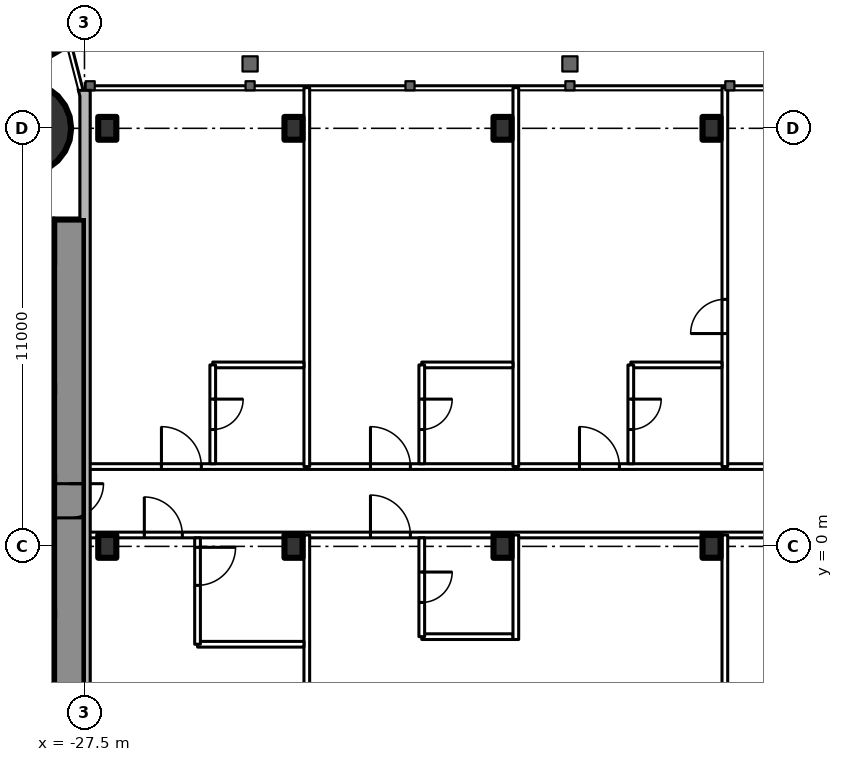
"""IFC4 building model, lengths in metres.
Left out: names, types, materials, properties, quantities, classifications, styles, units other than length and angle.
Written with IfcOpenShell. Run it as: python <this file> out.ifc"""

import sys

from ifc_helpers import new_model, si_unit, direction, frame, frame_2d, origin, origin_2d, place, context, subcontext, project, spatial, rectangle, circle, i_section, extrude, element, fill, save


model = new_model("IFC4")
c1 = context("Model", 3, precision=1e-05, world=origin(), true_north=direction((0.0, 1.0)))
c2 = subcontext(c1, "Body", "Model", "MODEL_VIEW")
j1 = project(units=[si_unit("LENGTHUNIT", "METRE"), si_unit("PLANEANGLEUNIT", "RADIAN")], contexts=[c1])
p1 = place(None, origin())
s1 = spatial("IfcSite", under=j1, at=p1, CompositionType="ELEMENT")
p2 = place(p1, origin())
s2 = spatial("IfcBuilding", under=s1, at=p2, CompositionType="ELEMENT")
p3 = place(p2, frame((0.0, 0.0, 226.1)))
s3 = spatial("IfcBuildingStorey", under=s2, at=p3, CompositionType="ELEMENT", Elevation=226.1)
p4 = place(p3, frame((-29.05, 11.0, 0.0), z_axis=(0.0, 0.0, 1.0), x_axis=(1.0, 0.0, 0.0)))
e1 = element("IfcColumn", 1, at=p4, inside=s3, PredefinedType="COLUMN", context=c2, shape_type="SweptSolid", body=[
    extrude(circle(Radius=1.2, at=origin_2d()), origin(), (0.0, 0.0, 1.0), 3.6),
])
p5 = place(p3, frame((-27.9, 8.6, 0.0), z_axis=(0.0, 0.0, 1.0), x_axis=(0.0, -1.0, 0.0)))
e2 = element("IfcWall", 2, at=p5, inside=s3, PredefinedType="SHEAR", context=c2, shape_type="SweptSolid", body=[
    extrude(rectangle(XDim=17.2, YDim=0.8, at=frame_2d((8.6, 0.0))), origin(), (0.0, 0.0, 1.0), 3.6),
])
p6 = place(p5, frame((6.95, 0.0, 0.0)))
e3 = element("IfcOpeningElement", 3, at=p6, cuts=e2, PredefinedType="OPENING", context=c2, shape_type="SweptSolid", body=[
    extrude(rectangle(XDim=0.9, YDim=2.2, at=frame_2d((0.45, 1.1))), frame((0.0, 0.41, 0.0), z_axis=(0.0, -1.0, 0.0), x_axis=(1.0, 0.0, 0.0)), (0.0, 0.0, 1.0), 0.82),
])
p7 = place(p3, frame((-28.3, 8.0, 0.0), z_axis=(0.0, 0.0, 1.0), x_axis=(-1.0, 0.0, 0.0)))
e4 = element("IfcWall", 4, at=p7, inside=s3, PredefinedType="SHEAR", context=c2, shape_type="SweptSolid", body=[
    extrude(rectangle(XDim=8.4, YDim=1.2, at=frame_2d((4.2, 0.0))), origin(), (0.0, 0.0, 1.0), 3.6),
])
p8 = place(p7, frame((0.25, 0.0, 0.0)))
e5 = element("IfcOpeningElement", 5, at=p8, cuts=e4, PredefinedType="OPENING", context=c2, shape_type="SweptSolid", body=[
    extrude(rectangle(XDim=1.0, YDim=2.2, at=frame_2d((0.5, 1.1))), frame((0.0, 0.61, 0.0), z_axis=(0.0, -1.0, 0.0), x_axis=(1.0, 0.0, 0.0)), (0.0, 0.0, 1.0), 1.22),
])
p9 = place(p3, frame((-28.3, 4.15, 0.0), z_axis=(0.0, 0.0, 1.0), x_axis=(-1.0, 0.0, 0.0)))
e6 = element("IfcWall", 6, at=p9, inside=s3, PredefinedType="SHEAR", context=c2, shape_type="SweptSolid", body=[
    extrude(rectangle(XDim=8.4, YDim=0.3, at=frame_2d((4.2, 0.0))), origin(), (0.0, 0.0, 1.0), 3.6),
])
for number, where, z_axis, x_axis in (
    (7, (-28.3, 1.775, 0.0), (0.0, 0.0, 1.0), (-1.0, 0.0, 0.0)),
    (8, (-28.3, -1.775, 0.0), (0.0, 0.0, 1.0), (-1.0, 0.0, 0.0)),
):
    element("IfcWall", number, at=place(p3, frame(where, z_axis=z_axis, x_axis=x_axis)), inside=s3, PredefinedType="SHEAR", context=c2, shape_type="SweptSolid", body=[
        extrude(rectangle(XDim=2.9, YDim=0.25, at=frame_2d((1.45, 0.0))), origin(), (0.0, 0.0, 1.0), 3.6),
    ])
p10 = place(p3, frame((-27.2, 14.3, 0.0), z_axis=(0.0, 0.0, 1.0), x_axis=(-0.866026593062, -0.499997940104, 0.0)))
e9 = element("IfcWall", 9, at=p10, inside=s3, PredefinedType="SHEAR", context=c2, shape_type="SweptSolid", body=[
    extrude(rectangle(XDim=28.946, YDim=1.2, at=frame_2d((14.473, 0.0))), origin(), (0.0, 0.0, 1.0), 3.6),
])
p11 = place(p10, frame((4.6, 0.0, 0.0)))
e10 = element("IfcOpeningElement", 10, at=p11, cuts=e9, PredefinedType="OPENING", context=c2, shape_type="SweptSolid", body=[
    extrude(rectangle(XDim=1.0, YDim=2.2, at=frame_2d((0.5, 1.1))), frame((0.0, 0.61, 0.0), z_axis=(0.0, -1.0, 0.0), x_axis=(1.0, 0.0, 0.0)), (0.0, 0.0, 1.0), 1.22),
])
p12 = place(p10, frame((13.395, 0.0, 0.0)))
e11 = element("IfcOpeningElement", 11, at=p12, cuts=e9, PredefinedType="OPENING", context=c2, shape_type="SweptSolid", body=[
    extrude(rectangle(XDim=1.8, YDim=2.2, at=frame_2d((0.9, 1.1))), frame((0.0, 0.61, 0.0), z_axis=(0.0, -1.0, 0.0), x_axis=(1.0, 0.0, 0.0)), (0.0, 0.0, 1.0), 1.22),
])
p13 = place(p3, frame((-27.2, -14.3, 0.0), z_axis=(0.0, 0.0, 1.0), x_axis=(-0.866024021859, 0.500002393557, 0.0)))
e12 = element("IfcWall", 12, at=p13, inside=s3, PredefinedType="SHEAR", context=c2, shape_type="SweptSolid", body=[
    extrude(rectangle(XDim=27.907, YDim=1.2, at=frame_2d((13.954, 0.0))), origin(), (0.0, 0.0, 1.0), 3.6),
])
p14 = place(p13, frame((4.6, 0.0, 0.0)))
e13 = element("IfcOpeningElement", 13, at=p14, cuts=e12, PredefinedType="OPENING", context=c2, shape_type="SweptSolid", body=[
    extrude(rectangle(XDim=1.0, YDim=2.2, at=frame_2d((0.5, 1.1))), frame((0.0, 0.61, 0.0), z_axis=(0.0, -1.0, 0.0), x_axis=(1.0, 0.0, 0.0)), (0.0, 0.0, 1.0), 1.22),
])
p15 = place(p13, frame((13.395, 0.0, 0.0)))
e14 = element("IfcOpeningElement", 14, at=p15, cuts=e12, PredefinedType="OPENING", context=c2, shape_type="SweptSolid", body=[
    extrude(rectangle(XDim=1.8, YDim=2.2, at=frame_2d((0.9, 1.1))), frame((0.0, 0.61, 0.0), z_axis=(0.0, -1.0, 0.0), x_axis=(1.0, 0.0, 0.0)), (0.0, 0.0, 1.0), 1.22),
])
for number, where, z_axis, x_axis in (
    (15, (-26.9, 0.0, 0.0), (0.0, 0.0, 1.0), (1.0, 0.0, 0.0)),
    (16, (-22.0, 0.0, 0.0), (0.0, 0.0, 1.0), (1.0, 0.0, 0.0)),
    (17, (-16.5, 0.0, 0.0), (0.0, 0.0, 1.0), (1.0, 0.0, 0.0)),
    (18, (-11.0, 0.0, 0.0), (0.0, 0.0, 1.0), (1.0, 0.0, 0.0)),
    (19, (-26.9, 11.0, 0.0), (0.0, 0.0, 1.0), (1.0, 0.0, 0.0)),
    (20, (-22.0, 11.0, 0.0), (0.0, 0.0, 1.0), (1.0, 0.0, 0.0)),
    (21, (-16.5, 11.0, 0.0), (0.0, 0.0, 1.0), (1.0, 0.0, 0.0)),
    (22, (-11.0, 11.0, 0.0), (0.0, 0.0, 1.0), (1.0, 0.0, 0.0)),
):
    element("IfcColumn", number, at=place(p3, frame(where, z_axis=z_axis, x_axis=x_axis)), inside=s3, PredefinedType="COLUMN", context=c2, shape_type="SweptSolid", body=[
        extrude(i_section(OverallWidth=0.476, OverallDepth=0.6, WebThickness=0.1, FlangeThickness=0.14, FilletRadius=0.02, at=origin_2d()), origin(), (0.0, 0.0, 1.0), 3.6),
    ])
p16 = place(p3, frame((-27.5, 0.3, 0.0), z_axis=(0.0, 0.0, 1.0), x_axis=(1.0, 0.0, 0.0)))
e23 = element("IfcWall", 23, at=p16, inside=s3, PredefinedType="PARTITIONING", context=c2, shape_type="SweptSolid", body=[
    extrude(rectangle(XDim=55.0, YDim=0.15, at=frame_2d((27.5, 0.0))), origin(), (0.0, 0.0, 1.0), 2.4),
])
p17 = place(p16, frame((1.575, 0.0, 0.0)))
e24 = element("IfcOpeningElement", 24, at=p17, cuts=e23, PredefinedType="OPENING", context=c2, shape_type="SweptSolid", body=[
    extrude(rectangle(XDim=1.0, YDim=2.2, at=frame_2d((0.5, 1.1))), frame((0.0, 0.085, 0.0), z_axis=(0.0, -1.0, 0.0), x_axis=(1.0, 0.0, 0.0)), (0.0, 0.0, 1.0), 0.17),
])
p18 = place(p16, frame((7.525, 0.0, 0.0)))
e25 = element("IfcOpeningElement", 25, at=p18, cuts=e23, PredefinedType="OPENING", context=c2, shape_type="SweptSolid", body=[
    extrude(rectangle(XDim=1.05, YDim=2.4, at=frame_2d((0.525, 1.2))), frame((0.0, 0.085, 0.0), z_axis=(0.0, -1.0, 0.0), x_axis=(1.0, 0.0, 0.0)), (0.0, 0.0, 1.0), 0.17),
])
p19 = place(p16, frame((18.525, 0.0, 0.0)))
e26 = element("IfcOpeningElement", 26, at=p19, cuts=e23, PredefinedType="OPENING", context=c2, shape_type="SweptSolid", body=[
    extrude(rectangle(XDim=1.05, YDim=2.4, at=frame_2d((0.525, 1.2))), frame((0.0, 0.085, 0.0), z_axis=(0.0, -1.0, 0.0), x_axis=(1.0, 0.0, 0.0)), (0.0, 0.0, 1.0), 0.17),
])
p20 = place(p16, frame((24.025, 0.0, 0.0)))
e27 = element("IfcOpeningElement", 27, at=p20, cuts=e23, PredefinedType="OPENING", context=c2, shape_type="SweptSolid", body=[
    extrude(rectangle(XDim=1.05, YDim=2.4, at=frame_2d((0.525, 1.2))), frame((0.0, 0.085, 0.0), z_axis=(0.0, -1.0, 0.0), x_axis=(1.0, 0.0, 0.0)), (0.0, 0.0, 1.0), 0.17),
])
p21 = place(p16, frame((35.025, 0.0, 0.0)))
e28 = element("IfcOpeningElement", 28, at=p21, cuts=e23, PredefinedType="OPENING", context=c2, shape_type="SweptSolid", body=[
    extrude(rectangle(XDim=1.05, YDim=2.4, at=frame_2d((0.525, 1.2))), frame((0.0, 0.085, 0.0), z_axis=(0.0, -1.0, 0.0), x_axis=(1.0, 0.0, 0.0)), (0.0, 0.0, 1.0), 0.17),
])
p22 = place(p16, frame((40.525, 0.0, 0.0)))
e29 = element("IfcOpeningElement", 29, at=p22, cuts=e23, PredefinedType="OPENING", context=c2, shape_type="SweptSolid", body=[
    extrude(rectangle(XDim=1.05, YDim=2.4, at=frame_2d((0.525, 1.2))), frame((0.0, 0.085, 0.0), z_axis=(0.0, -1.0, 0.0), x_axis=(1.0, 0.0, 0.0)), (0.0, 0.0, 1.0), 0.17),
])
p23 = place(p16, frame((52.525, 0.0, 0.0)))
e30 = element("IfcOpeningElement", 30, at=p23, cuts=e23, PredefinedType="OPENING", context=c2, shape_type="SweptSolid", body=[
    extrude(rectangle(XDim=1.05, YDim=2.4, at=frame_2d((0.525, 1.2))), frame((0.0, 0.085, 0.0), z_axis=(0.0, -1.0, 0.0), x_axis=(1.0, 0.0, 0.0)), (0.0, 0.0, 1.0), 0.17),
])
p24 = place(p3, frame((-27.5, 2.1, 0.0), z_axis=(0.0, 0.0, 1.0), x_axis=(1.0, 0.0, 0.0)))
e31 = element("IfcWall", 31, at=p24, inside=s3, PredefinedType="PARTITIONING", context=c2, shape_type="SweptSolid", body=[
    extrude(rectangle(XDim=22.35, YDim=0.15, at=frame_2d((11.175, 0.0))), origin(), (0.0, 0.0, 1.0), 3.4),
])
p25 = place(p24, frame((2.025, 0.0, 0.0)))
e32 = element("IfcOpeningElement", 32, at=p25, cuts=e31, PredefinedType="OPENING", context=c2, shape_type="SweptSolid", body=[
    extrude(rectangle(XDim=1.05, YDim=2.4, at=frame_2d((0.525, 1.2))), frame((0.0, 0.085, 0.0), z_axis=(0.0, -1.0, 0.0), x_axis=(1.0, 0.0, 0.0)), (0.0, 0.0, 1.0), 0.17),
])
p26 = place(p24, frame((7.525, 0.0, 0.0)))
e33 = element("IfcOpeningElement", 33, at=p26, cuts=e31, PredefinedType="OPENING", context=c2, shape_type="SweptSolid", body=[
    extrude(rectangle(XDim=1.05, YDim=2.4, at=frame_2d((0.525, 1.2))), frame((0.0, 0.085, 0.0), z_axis=(0.0, -1.0, 0.0), x_axis=(1.0, 0.0, 0.0)), (0.0, 0.0, 1.0), 0.17),
])
p27 = place(p24, frame((13.025, 0.0, 0.0)))
e34 = element("IfcOpeningElement", 34, at=p27, cuts=e31, PredefinedType="OPENING", context=c2, shape_type="SweptSolid", body=[
    extrude(rectangle(XDim=1.05, YDim=2.4, at=frame_2d((0.525, 1.2))), frame((0.0, 0.085, 0.0), z_axis=(0.0, -1.0, 0.0), x_axis=(1.0, 0.0, 0.0)), (0.0, 0.0, 1.0), 0.17),
])
p28 = place(p24, frame((18.525, 0.0, 0.0)))
e35 = element("IfcOpeningElement", 35, at=p28, cuts=e31, PredefinedType="OPENING", context=c2, shape_type="SweptSolid", body=[
    extrude(rectangle(XDim=1.05, YDim=2.4, at=frame_2d((0.525, 1.2))), frame((0.0, 0.085, 0.0), z_axis=(0.0, -1.0, 0.0), x_axis=(1.0, 0.0, 0.0)), (0.0, 0.0, 1.0), 0.17),
])
for number, where, z_axis, x_axis in (
    (36, (-21.65, -12.07, 0.0), (0.0, 0.0, 1.0), (0.0, 1.0, 0.0)),
    (37, (-10.65, -12.07, 0.0), (0.0, 0.0, 1.0), (0.0, 1.0, 0.0)),
):
    element("IfcWall", number, at=place(p3, frame(where, z_axis=z_axis, x_axis=x_axis)), inside=s3, PredefinedType="PARTITIONING", context=c2, shape_type="SweptSolid", body=[
        extrude(rectangle(XDim=12.37, YDim=0.15, at=frame_2d((6.185, 0.0))), origin(), (0.0, 0.0, 1.0), 3.4),
    ])
p29 = place(p3, frame((-24.525, -2.575, 0.0), z_axis=(0.0, 0.0, 1.0), x_axis=(1.0, 0.0, 0.0)))
e38 = element("IfcWall", 38, at=p29, inside=s3, PredefinedType="PARTITIONING", context=c2, shape_type="SweptSolid", body=[
    extrude(rectangle(XDim=2.8, YDim=0.15, at=frame_2d((1.4, 0.0))), origin(), (0.0, 0.0, 1.0), 3.4),
])
p30 = place(p3, frame((-24.525, -2.575, 0.0), z_axis=(0.0, 0.0, 1.0), x_axis=(0.0, 1.0, 0.0)))
e39 = element("IfcWall", 39, at=p30, inside=s3, PredefinedType="PARTITIONING", context=c2, shape_type="SweptSolid", body=[
    extrude(rectangle(XDim=2.8, YDim=0.15, at=frame_2d((1.4, 0.0))), origin(), (0.0, 0.0, 1.0), 3.4),
])
p31 = place(p30, frame((1.55, 0.0, 0.0)))
e40 = element("IfcOpeningElement", 40, at=p31, cuts=e39, PredefinedType="OPENING", context=c2, shape_type="SweptSolid", body=[
    extrude(rectangle(XDim=1.0, YDim=2.2, at=frame_2d((0.5, 1.1))), frame((0.0, 0.085, 0.0), z_axis=(0.0, -1.0, 0.0), x_axis=(1.0, 0.0, 0.0)), (0.0, 0.0, 1.0), 0.17),
])
p32 = place(p3, frame((-18.625, -2.375, 0.0), z_axis=(0.0, 0.0, 1.0), x_axis=(1.0, 0.0, 0.0)))
e41 = element("IfcWall", 41, at=p32, inside=s3, PredefinedType="PARTITIONING", context=c2, shape_type="SweptSolid", body=[
    extrude(rectangle(XDim=2.4, YDim=0.15, at=frame_2d((1.2, 0.0))), origin(), (0.0, 0.0, 1.0), 3.4),
])
p33 = place(p3, frame((-18.625, -2.375, 0.0), z_axis=(0.0, 0.0, 1.0), x_axis=(0.0, 1.0, 0.0)))
e42 = element("IfcWall", 42, at=p33, inside=s3, PredefinedType="PARTITIONING", context=c2, shape_type="SweptSolid", body=[
    extrude(rectangle(XDim=2.6, YDim=0.15, at=frame_2d((1.3, 0.0))), origin(), (0.0, 0.0, 1.0), 3.4),
])
p34 = place(p33, frame((0.9, 0.0, 0.0)))
e43 = element("IfcOpeningElement", 43, at=p34, cuts=e42, PredefinedType="OPENING", context=c2, shape_type="SweptSolid", body=[
    extrude(rectangle(XDim=0.8, YDim=2.2, at=frame_2d((0.4, 1.1))), frame((0.0, 0.085, 0.0), z_axis=(0.0, -1.0, 0.0), x_axis=(1.0, 0.0, 0.0)), (0.0, 0.0, 1.0), 0.17),
])
for number, where, z_axis, x_axis in (
    (44, (-21.65, 2.1, 0.0), (0.0, 0.0, 1.0), (0.0, 1.0, 0.0)),
    (45, (-16.15, 2.1, 0.0), (0.0, 0.0, 1.0), (0.0, 1.0, 0.0)),
):
    element("IfcWall", number, at=place(p3, frame(where, z_axis=z_axis, x_axis=x_axis)), inside=s3, PredefinedType="PARTITIONING", context=c2, shape_type="SweptSolid", body=[
        extrude(rectangle(XDim=9.97, YDim=0.15, at=frame_2d((4.985, 0.0))), origin(), (0.0, 0.0, 1.0), 3.4),
    ])
p35 = place(p3, frame((-10.65, 2.1, 0.0), z_axis=(0.0, 0.0, 1.0), x_axis=(0.0, 1.0, 0.0)))
e46 = element("IfcWall", 46, at=p35, inside=s3, PredefinedType="PARTITIONING", context=c2, shape_type="SweptSolid", body=[
    extrude(rectangle(XDim=9.97, YDim=0.15, at=frame_2d((4.985, 0.0))), origin(), (0.0, 0.0, 1.0), 3.4),
])
p36 = place(p35, frame((3.5, 0.0, 0.0)))
e47 = element("IfcOpeningElement", 47, at=p36, cuts=e46, PredefinedType="OPENING", context=c2, shape_type="SweptSolid", body=[
    extrude(rectangle(XDim=0.9, YDim=2.2, at=frame_2d((0.45, 1.1))), frame((0.0, 0.085, 0.0), z_axis=(0.0, -1.0, 0.0), x_axis=(1.0, 0.0, 0.0)), (0.0, 0.0, 1.0), 0.17),
])
p37 = place(p3, frame((-24.125, 4.775, 0.0), z_axis=(0.0, 0.0, 1.0), x_axis=(1.0, 0.0, 0.0)))
e48 = element("IfcWall", 48, at=p37, inside=s3, PredefinedType="PARTITIONING", context=c2, shape_type="SweptSolid", body=[
    extrude(rectangle(XDim=2.4, YDim=0.15, at=frame_2d((1.2, 0.0))), origin(), (0.0, 0.0, 1.0), 3.4),
])
p38 = place(p3, frame((-24.125, 2.175, 0.0), z_axis=(0.0, 0.0, 1.0), x_axis=(0.0, 1.0, 0.0)))
e49 = element("IfcWall", 49, at=p38, inside=s3, PredefinedType="PARTITIONING", context=c2, shape_type="SweptSolid", body=[
    extrude(rectangle(XDim=2.6, YDim=0.15, at=frame_2d((1.3, 0.0))), origin(), (0.0, 0.0, 1.0), 3.4),
])
p39 = place(p38, frame((0.9, 0.0, 0.0)))
e50 = element("IfcOpeningElement", 50, at=p39, cuts=e49, PredefinedType="OPENING", context=c2, shape_type="SweptSolid", body=[
    extrude(rectangle(XDim=0.8, YDim=2.2, at=frame_2d((0.4, 1.1))), frame((0.0, 0.085, 0.0), z_axis=(0.0, -1.0, 0.0), x_axis=(1.0, 0.0, 0.0)), (0.0, 0.0, 1.0), 0.17),
])
p40 = place(p3, frame((-18.625, 4.775, 0.0), z_axis=(0.0, 0.0, 1.0), x_axis=(1.0, 0.0, 0.0)))
e51 = element("IfcWall", 51, at=p40, inside=s3, PredefinedType="PARTITIONING", context=c2, shape_type="SweptSolid", body=[
    extrude(rectangle(XDim=2.4, YDim=0.15, at=frame_2d((1.2, 0.0))), origin(), (0.0, 0.0, 1.0), 3.4),
])
p41 = place(p3, frame((-18.625, 2.175, 0.0), z_axis=(0.0, 0.0, 1.0), x_axis=(0.0, 1.0, 0.0)))
e52 = element("IfcWall", 52, at=p41, inside=s3, PredefinedType="PARTITIONING", context=c2, shape_type="SweptSolid", body=[
    extrude(rectangle(XDim=2.6, YDim=0.15, at=frame_2d((1.3, 0.0))), origin(), (0.0, 0.0, 1.0), 3.4),
])
p42 = place(p41, frame((0.9, 0.0, 0.0)))
e53 = element("IfcOpeningElement", 53, at=p42, cuts=e52, PredefinedType="OPENING", context=c2, shape_type="SweptSolid", body=[
    extrude(rectangle(XDim=0.8, YDim=2.2, at=frame_2d((0.4, 1.1))), frame((0.0, 0.085, 0.0), z_axis=(0.0, -1.0, 0.0), x_axis=(1.0, 0.0, 0.0)), (0.0, 0.0, 1.0), 0.17),
])
p43 = place(p3, frame((-13.125, 4.775, 0.0), z_axis=(0.0, 0.0, 1.0), x_axis=(1.0, 0.0, 0.0)))
e54 = element("IfcWall", 54, at=p43, inside=s3, PredefinedType="PARTITIONING", context=c2, shape_type="SweptSolid", body=[
    extrude(rectangle(XDim=2.4, YDim=0.15, at=frame_2d((1.2, 0.0))), origin(), (0.0, 0.0, 1.0), 3.4),
])
p44 = place(p3, frame((-13.125, 2.175, 0.0), z_axis=(0.0, 0.0, 1.0), x_axis=(0.0, 1.0, 0.0)))
e55 = element("IfcWall", 55, at=p44, inside=s3, PredefinedType="PARTITIONING", context=c2, shape_type="SweptSolid", body=[
    extrude(rectangle(XDim=2.6, YDim=0.15, at=frame_2d((1.3, 0.0))), origin(), (0.0, 0.0, 1.0), 3.4),
])
p45 = place(p44, frame((0.9, 0.0, 0.0)))
e56 = element("IfcOpeningElement", 56, at=p45, cuts=e55, PredefinedType="OPENING", context=c2, shape_type="SweptSolid", body=[
    extrude(rectangle(XDim=0.8, YDim=2.2, at=frame_2d((0.4, 1.1))), frame((0.0, 0.085, 0.0), z_axis=(0.0, -1.0, 0.0), x_axis=(1.0, 0.0, 0.0)), (0.0, 0.0, 1.0), 0.17),
])
p46 = place(p3, frame((-16.15, -2.45, 0.0), z_axis=(0.0, 0.0, 1.0), x_axis=(0.0, 1.0, 0.0)))
e57 = element("IfcWall", 57, at=p46, inside=s3, PredefinedType="PARTITIONING", context=c2, shape_type="SweptSolid", body=[
    extrude(rectangle(XDim=2.75, YDim=0.15, at=frame_2d((1.375, 0.0))), origin(), (0.0, 0.0, 1.0), 3.4),
])
p47 = place(p6, origin())
e58 = element("IfcDoor", 58, at=p47, inside=s3, OperationType="SINGLE_SWING_LEFT", PredefinedType="DOOR", context=c2, shape_type="SweptSolid", body=[
    extrude(rectangle(XDim=0.9, YDim=2.2, at=frame_2d((0.45, 1.1))), frame((0.0, 0.025, 0.0), z_axis=(0.0, -1.0, 0.0), x_axis=(1.0, 0.0, 0.0)), (0.0, 0.0, 1.0), 0.05),
])
fill(e3, e58)
p48 = place(p31, origin())
e59 = element("IfcDoor", 59, at=p48, inside=s3, OperationType="SINGLE_SWING_RIGHT", PredefinedType="DOOR", context=c2, shape_type="SweptSolid", body=[
    extrude(rectangle(XDim=1.0, YDim=2.2, at=frame_2d((0.5, 1.1))), frame((0.0, 0.025, 0.0), z_axis=(0.0, -1.0, 0.0), x_axis=(1.0, 0.0, 0.0)), (0.0, 0.0, 1.0), 0.05),
])
fill(e40, e59)
p49 = place(p17, origin())
e60 = element("IfcDoor", 60, at=p49, inside=s3, OperationType="SINGLE_SWING_LEFT", PredefinedType="DOOR", context=c2, shape_type="SweptSolid", body=[
    extrude(rectangle(XDim=1.0, YDim=2.2, at=frame_2d((0.5, 1.1))), frame((0.0, 0.025, 0.0), z_axis=(0.0, -1.0, 0.0), x_axis=(1.0, 0.0, 0.0)), (0.0, 0.0, 1.0), 0.05),
])
fill(e24, e60)
p50 = place(p34, origin())
e61 = element("IfcDoor", 61, at=p50, inside=s3, OperationType="SINGLE_SWING_RIGHT", PredefinedType="DOOR", context=c2, shape_type="SweptSolid", body=[
    extrude(rectangle(XDim=0.8, YDim=2.2, at=frame_2d((0.4, 1.1))), frame((0.0, 0.025, 0.0), z_axis=(0.0, -1.0, 0.0), x_axis=(1.0, 0.0, 0.0)), (0.0, 0.0, 1.0), 0.05),
])
fill(e43, e61)
p51 = place(p18, origin())
e62 = element("IfcDoor", 62, at=p51, inside=s3, OperationType="SINGLE_SWING_LEFT", PredefinedType="DOOR", context=c2, shape_type="SweptSolid", body=[
    extrude(rectangle(XDim=1.05, YDim=2.4, at=frame_2d((0.525, 1.2))), frame((0.0, 0.025, 0.0), z_axis=(0.0, -1.0, 0.0), x_axis=(1.0, 0.0, 0.0)), (0.0, 0.0, 1.0), 0.05),
])
fill(e25, e62)
p52 = place(p39, origin())
e63 = element("IfcDoor", 63, at=p52, inside=s3, OperationType="SINGLE_SWING_RIGHT", PredefinedType="DOOR", context=c2, shape_type="SweptSolid", body=[
    extrude(rectangle(XDim=0.8, YDim=2.2, at=frame_2d((0.4, 1.1))), frame((0.0, 0.025, 0.0), z_axis=(0.0, -1.0, 0.0), x_axis=(1.0, 0.0, 0.0)), (0.0, 0.0, 1.0), 0.05),
])
fill(e50, e63)
p53 = place(p25, origin())
e64 = element("IfcDoor", 64, at=p53, inside=s3, OperationType="SINGLE_SWING_LEFT", PredefinedType="DOOR", context=c2, shape_type="SweptSolid", body=[
    extrude(rectangle(XDim=1.05, YDim=2.4, at=frame_2d((0.525, 1.2))), frame((0.0, 0.025, 0.0), z_axis=(0.0, -1.0, 0.0), x_axis=(1.0, 0.0, 0.0)), (0.0, 0.0, 1.0), 0.05),
])
fill(e32, e64)
p54 = place(p42, origin())
e65 = element("IfcDoor", 65, at=p54, inside=s3, OperationType="SINGLE_SWING_RIGHT", PredefinedType="DOOR", context=c2, shape_type="SweptSolid", body=[
    extrude(rectangle(XDim=0.8, YDim=2.2, at=frame_2d((0.4, 1.1))), frame((0.0, 0.025, 0.0), z_axis=(0.0, -1.0, 0.0), x_axis=(1.0, 0.0, 0.0)), (0.0, 0.0, 1.0), 0.05),
])
fill(e53, e65)
p55 = place(p26, origin())
e66 = element("IfcDoor", 66, at=p55, inside=s3, OperationType="SINGLE_SWING_LEFT", PredefinedType="DOOR", context=c2, shape_type="SweptSolid", body=[
    extrude(rectangle(XDim=1.05, YDim=2.4, at=frame_2d((0.525, 1.2))), frame((0.0, 0.025, 0.0), z_axis=(0.0, -1.0, 0.0), x_axis=(1.0, 0.0, 0.0)), (0.0, 0.0, 1.0), 0.05),
])
fill(e33, e66)
p56 = place(p45, origin())
e67 = element("IfcDoor", 67, at=p56, inside=s3, OperationType="SINGLE_SWING_RIGHT", PredefinedType="DOOR", context=c2, shape_type="SweptSolid", body=[
    extrude(rectangle(XDim=0.8, YDim=2.2, at=frame_2d((0.4, 1.1))), frame((0.0, 0.025, 0.0), z_axis=(0.0, -1.0, 0.0), x_axis=(1.0, 0.0, 0.0)), (0.0, 0.0, 1.0), 0.05),
])
fill(e56, e67)
p57 = place(p27, origin())
e68 = element("IfcDoor", 68, at=p57, inside=s3, OperationType="SINGLE_SWING_LEFT", PredefinedType="DOOR", context=c2, shape_type="SweptSolid", body=[
    extrude(rectangle(XDim=1.05, YDim=2.4, at=frame_2d((0.525, 1.2))), frame((0.0, 0.025, 0.0), z_axis=(0.0, -1.0, 0.0), x_axis=(1.0, 0.0, 0.0)), (0.0, 0.0, 1.0), 0.05),
])
fill(e34, e68)
p58 = place(p36, origin())
e69 = element("IfcDoor", 69, at=p58, inside=s3, OperationType="SINGLE_SWING_LEFT", PredefinedType="DOOR", context=c2, shape_type="SweptSolid", body=[
    extrude(rectangle(XDim=0.9, YDim=2.2, at=frame_2d((0.45, 1.1))), frame((0.0, 0.025, 0.0), z_axis=(0.0, -1.0, 0.0), x_axis=(1.0, 0.0, 0.0)), (0.0, 0.0, 1.0), 0.05),
])
fill(e47, e69)
save(model, sys.argv[1])
